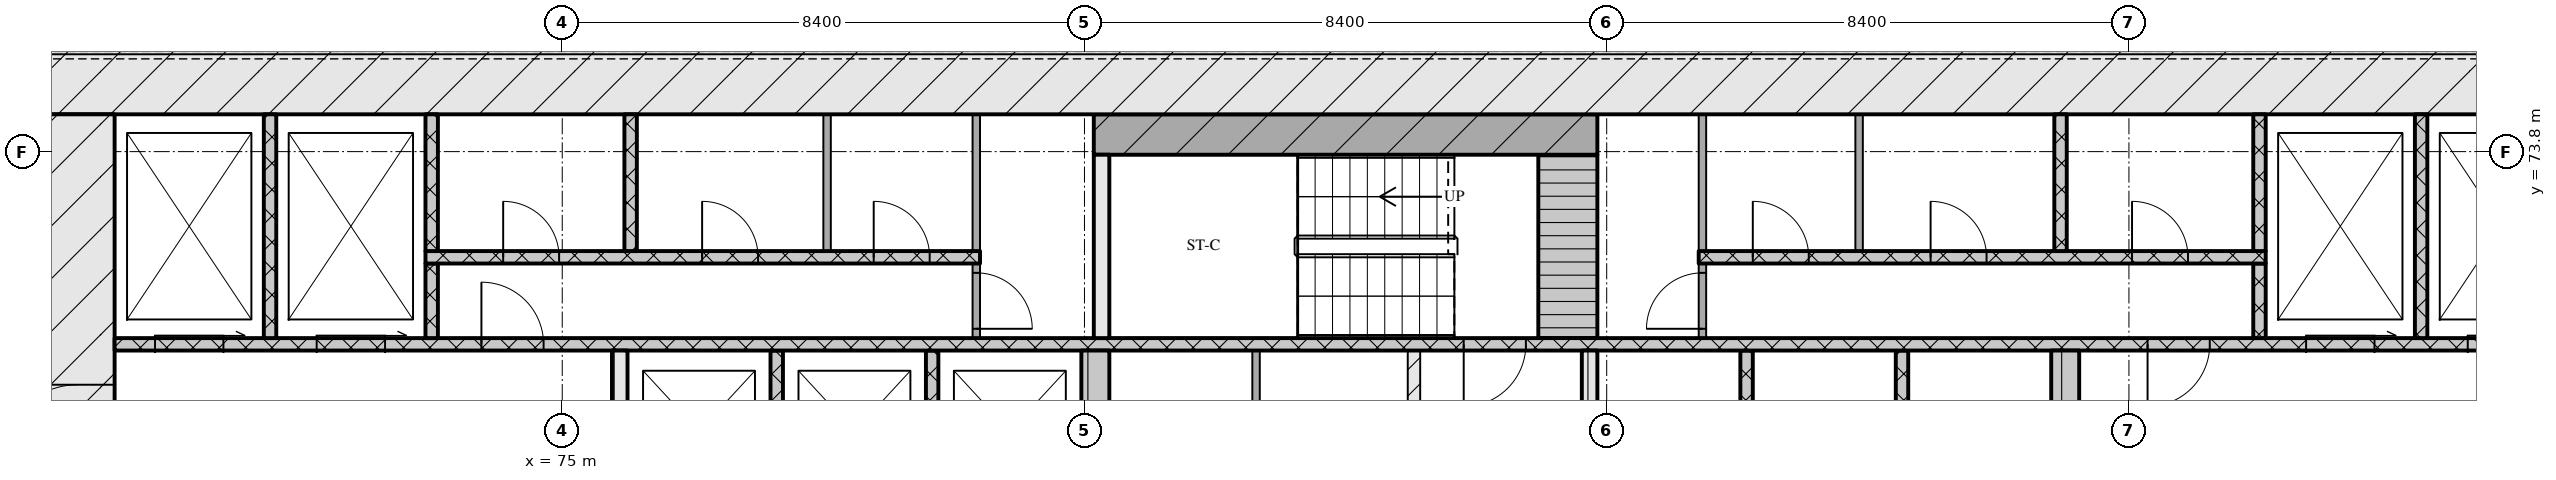
"""IFC4 building model, lengths in metres.
Left out: names, types, materials, properties, quantities, classifications, styles, units other than length and angle.
Written with IfcOpenShell. Run it as: python <this file> out.ifc"""

import sys

from ifc_helpers import new_model, si_unit, direction, frame, frame_2d, origin, place, context, subcontext, project, spatial, rectangle, extrude, element, fill, save


model = new_model("IFC4")
c1 = context("Model", 3, precision=1e-05, world=origin(), true_north=direction((0.0, 1.0)))
c2 = subcontext(c1, "Body", "Model", "MODEL_VIEW")
j1 = project(units=[si_unit("LENGTHUNIT", "METRE"), si_unit("PLANEANGLEUNIT", "RADIAN")], contexts=[c1])
p1 = place(None, origin())
s1 = spatial("IfcSite", under=j1, at=p1, CompositionType="ELEMENT")
p2 = place(p1, origin())
s2 = spatial("IfcBuilding", under=s1, at=p2, CompositionType="ELEMENT")
p3 = place(p2, frame((0.0, 0.0, 40.8)))
s3 = spatial("IfcBuildingStorey", under=s2, at=p3, CompositionType="ELEMENT", Elevation=40.8)
p4 = place(p3, frame((66.6, 75.0, 0.0), z_axis=(0.0, 0.0, 1.0), x_axis=(1.0, 0.0, 0.0)))
e1 = element("IfcWall", 1, at=p4, inside=s3, PredefinedType="SOLIDWALL", context=c2, shape_type="SweptSolid", body=[
    extrude(rectangle(XDim=42.0, YDim=1.2, at=frame_2d((21.0, 0.0))), origin(), (0.0, 0.0, 1.0), 3.32),
])
p5 = place(p3, frame((67.2, 62.4, 0.0), z_axis=(0.0, 0.0, 1.0), x_axis=(0.0, 1.0, 0.0)))
e2 = element("IfcWall", 2, at=p5, inside=s3, PredefinedType="SOLIDWALL", context=c2, shape_type="SweptSolid", body=[
    extrude(rectangle(XDim=12.0, YDim=1.2, at=frame_2d((6.0, 0.0))), origin(), (0.0, 0.0, 1.0), 3.32),
])
p6 = place(p5, frame((6.45, 0.0, 0.0)))
e3 = element("IfcOpeningElement", 3, at=p6, cuts=e2, PredefinedType="OPENING", context=c2, shape_type="SweptSolid", body=[
    extrude(rectangle(XDim=1.2, YDim=2.1, at=frame_2d((0.6, 1.05))), frame((0.0, 0.61, 0.0), z_axis=(0.0, -1.0, 0.0), x_axis=(1.0, 0.0, 0.0)), (0.0, 0.0, 1.0), 1.22),
])
for number, where, z_axis, x_axis in (
    (4, (78.45, 68.0, 0.0), (0.0, 0.0, 1.0), (0.0, 1.0, 0.0)),
    (5, (80.95, 68.0, 0.0), (0.0, 0.0, 1.0), (0.0, 1.0, 0.0)),
):
    element("IfcWall", number, at=place(p3, frame(where, z_axis=z_axis, x_axis=x_axis)), inside=s3, PredefinedType="SOLIDWALL", context=c2, shape_type="SweptSolid", body=[
        extrude(rectangle(XDim=2.6, YDim=0.2, at=frame_2d((1.3, 0.0))), origin(), (0.0, 0.0, 1.0), 3.32),
    ])
p7 = place(p3, frame((83.575, 68.0, 0.0), z_axis=(0.0, 0.0, 1.0), x_axis=(0.0, 1.0, 0.0)))
e6 = element("IfcWall", 6, at=p7, inside=s3, PredefinedType="SOLIDWALL", context=c2, shape_type="SweptSolid", body=[
    extrude(rectangle(XDim=2.6, YDim=0.45, at=frame_2d((1.3, 0.0))), origin(), (0.0, 0.0, 1.0), 3.32),
])
p8 = place(p3, frame((86.16, 68.0, 0.0), z_axis=(0.0, 0.0, 1.0), x_axis=(0.0, 1.0, 0.0)))
e7 = element("IfcWall", 7, at=p8, inside=s3, PredefinedType="PARTITIONING", context=c2, shape_type="SweptSolid", body=[
    extrude(rectangle(XDim=2.6, YDim=0.12, at=frame_2d((1.3, 0.0))), origin(), (0.0, 0.0, 1.0), 3.32),
])
p9 = place(p3, frame((88.7, 68.0, 0.0), z_axis=(0.0, 0.0, 1.0), x_axis=(0.0, 1.0, 0.0)))
e8 = element("IfcWall", 8, at=p9, inside=s3, PredefinedType="PARTITIONING", context=c2, shape_type="SweptSolid", body=[
    extrude(rectangle(XDim=2.6, YDim=0.2, at=frame_2d((1.3, 0.0))), origin(), (0.0, 0.0, 1.0), 3.32),
])
p10 = place(p3, frame((91.525, 68.0, 0.0), z_axis=(0.0, 0.0, 1.0), x_axis=(0.0, 1.0, 0.0)))
e9 = element("IfcWall", 9, at=p10, inside=s3, PredefinedType="SOLIDWALL", context=c2, shape_type="SweptSolid", body=[
    extrude(rectangle(XDim=2.6, YDim=0.25, at=frame_2d((1.3, 0.0))), origin(), (0.0, 0.0, 1.0), 3.32),
])
for number, where, z_axis, x_axis in (
    (10, (94.05, 68.0, 0.0), (0.0, 0.0, 1.0), (0.0, 1.0, 0.0)),
    (11, (96.55, 68.0, 0.0), (0.0, 0.0, 1.0), (0.0, 1.0, 0.0)),
):
    element("IfcWall", number, at=place(p3, frame(where, z_axis=z_axis, x_axis=x_axis)), inside=s3, PredefinedType="SOLIDWALL", context=c2, shape_type="SweptSolid", body=[
        extrude(rectangle(XDim=2.6, YDim=0.2, at=frame_2d((1.3, 0.0))), origin(), (0.0, 0.0, 1.0), 3.32),
    ])
p11 = place(p3, frame((75.925, 68.3, 0.0), z_axis=(0.0, 0.0, 1.0), x_axis=(0.0, 1.0, 0.0)))
e12 = element("IfcWall", 12, at=p11, inside=s3, PredefinedType="SOLIDWALL", context=c2, shape_type="SweptSolid", body=[
    extrude(rectangle(XDim=2.3, YDim=0.25, at=frame_2d((1.15, 0.0))), origin(), (0.0, 0.0, 1.0), 3.32),
])
p12 = place(p3, frame((99.175, 68.3, 0.0), z_axis=(0.0, 0.0, 1.0), x_axis=(0.0, 1.0, 0.0)))
e13 = element("IfcWall", 13, at=p12, inside=s3, PredefinedType="SOLIDWALL", context=c2, shape_type="SweptSolid", body=[
    extrude(rectangle(XDim=2.3, YDim=0.45, at=frame_2d((1.15, 0.0))), origin(), (0.0, 0.0, 1.0), 3.32),
])
p13 = place(p3, frame((67.8, 70.7, 0.0), z_axis=(0.0, 0.0, 1.0), x_axis=(1.0, 0.0, 0.0)))
e14 = element("IfcWall", 14, at=p13, inside=s3, PredefinedType="SOLIDWALL", context=c2, shape_type="SweptSolid", body=[
    extrude(rectangle(XDim=39.6, YDim=0.2, at=frame_2d((19.8, 0.0))), origin(), (0.0, 0.0, 1.0), 3.32),
])
p14 = place(p13, frame((0.65, 0.0, 0.0)))
e15 = element("IfcOpeningElement", 15, at=p14, cuts=e14, PredefinedType="OPENING", context=c2, shape_type="SweptSolid", body=[
    extrude(rectangle(XDim=1.1, YDim=2.1, at=frame_2d((0.55, 1.05))), frame((0.0, 0.11, 0.0), z_axis=(0.0, -1.0, 0.0), x_axis=(1.0, 0.0, 0.0)), (0.0, 0.0, 1.0), 0.22),
])
p15 = place(p13, frame((3.25, 0.0, 0.0)))
e16 = element("IfcOpeningElement", 16, at=p15, cuts=e14, PredefinedType="OPENING", context=c2, shape_type="SweptSolid", body=[
    extrude(rectangle(XDim=1.1, YDim=2.1, at=frame_2d((0.55, 1.05))), frame((0.0, 0.11, 0.0), z_axis=(0.0, -1.0, 0.0), x_axis=(1.0, 0.0, 0.0)), (0.0, 0.0, 1.0), 0.22),
])
p16 = place(p13, frame((5.9, 0.0, 0.0)))
e17 = element("IfcOpeningElement", 17, at=p16, cuts=e14, PredefinedType="OPENING", context=c2, shape_type="SweptSolid", body=[
    extrude(rectangle(XDim=1.0, YDim=2.1, at=frame_2d((0.5, 1.05))), frame((0.0, 0.11, 0.0), z_axis=(0.0, -1.0, 0.0), x_axis=(1.0, 0.0, 0.0)), (0.0, 0.0, 1.0), 0.22),
])
p17 = place(p13, frame((21.7, 0.0, 0.0)))
e18 = element("IfcOpeningElement", 18, at=p17, cuts=e14, PredefinedType="OPENING", context=c2, shape_type="SweptSolid", body=[
    extrude(rectangle(XDim=1.0, YDim=2.1, at=frame_2d((0.5, 1.05))), frame((0.0, 0.11, 0.0), z_axis=(0.0, -1.0, 0.0), x_axis=(1.0, 0.0, 0.0)), (0.0, 0.0, 1.0), 0.22),
])
p18 = place(p13, frame((32.7, 0.0, 0.0)))
e19 = element("IfcOpeningElement", 19, at=p18, cuts=e14, PredefinedType="OPENING", context=c2, shape_type="SweptSolid", body=[
    extrude(rectangle(XDim=1.0, YDim=2.1, at=frame_2d((0.5, 1.05))), frame((0.0, 0.11, 0.0), z_axis=(0.0, -1.0, 0.0), x_axis=(1.0, 0.0, 0.0)), (0.0, 0.0, 1.0), 0.22),
])
p19 = place(p13, frame((35.25, 0.0, 0.0)))
e20 = element("IfcOpeningElement", 20, at=p19, cuts=e14, PredefinedType="OPENING", context=c2, shape_type="SweptSolid", body=[
    extrude(rectangle(XDim=1.1, YDim=2.1, at=frame_2d((0.55, 1.05))), frame((0.0, 0.11, 0.0), z_axis=(0.0, -1.0, 0.0), x_axis=(1.0, 0.0, 0.0)), (0.0, 0.0, 1.0), 0.22),
])
p20 = place(p13, frame((37.85, 0.0, 0.0)))
e21 = element("IfcOpeningElement", 21, at=p20, cuts=e14, PredefinedType="OPENING", context=c2, shape_type="SweptSolid", body=[
    extrude(rectangle(XDim=1.1, YDim=2.1, at=frame_2d((0.55, 1.05))), frame((0.0, 0.11, 0.0), z_axis=(0.0, -1.0, 0.0), x_axis=(1.0, 0.0, 0.0)), (0.0, 0.0, 1.0), 0.22),
])
p21 = place(p3, frame((70.3, 70.8, 0.0), z_axis=(0.0, 0.0, 1.0), x_axis=(0.0, 1.0, 0.0)))
e22 = element("IfcWall", 22, at=p21, inside=s3, PredefinedType="SOLIDWALL", context=c2, shape_type="SweptSolid", body=[
    extrude(rectangle(XDim=3.6, YDim=0.2, at=frame_2d((1.8, 0.0))), origin(), (0.0, 0.0, 1.0), 3.32),
])
p22 = place(p3, frame((72.9, 70.8, 0.0), z_axis=(0.0, 0.0, 1.0), x_axis=(0.0, 1.0, 0.0)))
e23 = element("IfcWall", 23, at=p22, inside=s3, PredefinedType="SOLIDWALL", context=c2, shape_type="SweptSolid", body=[
    extrude(rectangle(XDim=1.2, YDim=0.2, at=frame_2d((0.6, 0.0))), origin(), (0.0, 0.0, 1.0), 3.32),
])
p23 = place(p3, frame((81.66, 70.8, 0.0), z_axis=(0.0, 0.0, 1.0), x_axis=(0.0, 1.0, 0.0)))
e24 = element("IfcWall", 24, at=p23, inside=s3, PredefinedType="PARTITIONING", context=c2, shape_type="SweptSolid", body=[
    extrude(rectangle(XDim=1.2, YDim=0.12, at=frame_2d((0.6, 0.0))), origin(), (0.0, 0.0, 1.0), 3.32),
])
p24 = place(p23, frame((0.15, 0.0, 0.0)))
e25 = element("IfcOpeningElement", 25, at=p24, cuts=e24, PredefinedType="OPENING", context=c2, shape_type="SweptSolid", body=[
    extrude(rectangle(XDim=0.9, YDim=2.1, at=frame_2d((0.45, 1.05))), frame((0.0, 0.07, 0.0), z_axis=(0.0, -1.0, 0.0), x_axis=(1.0, 0.0, 0.0)), (0.0, 0.0, 1.0), 0.14),
])
p25 = place(p3, frame((83.675, 70.8, 0.0), z_axis=(0.0, 0.0, 1.0), x_axis=(0.0, 1.0, 0.0)))
e26 = element("IfcWall", 26, at=p25, inside=s3, PredefinedType="SOLIDWALL", context=c2, shape_type="SweptSolid", body=[
    extrude(rectangle(XDim=2.95, YDim=0.25, at=frame_2d((1.475, 0.0))), origin(), (0.0, 0.0, 1.0), 3.32),
])
p26 = place(p3, frame((91.175, 70.8, 0.0), z_axis=(0.0, 0.0, 1.0), x_axis=(0.0, 1.0, 0.0)))
e27 = element("IfcWall", 27, at=p26, inside=s3, PredefinedType="SOLIDWALL", context=c2, shape_type="SweptSolid", body=[
    extrude(rectangle(XDim=2.95, YDim=0.95, at=frame_2d((1.475, 0.0))), origin(), (0.0, 0.0, 1.0), 3.32),
])
p27 = place(p3, frame((93.34, 70.8, 0.0), z_axis=(0.0, 0.0, 1.0), x_axis=(0.0, 1.0, 0.0)))
e28 = element("IfcWall", 28, at=p27, inside=s3, PredefinedType="PARTITIONING", context=c2, shape_type="SweptSolid", body=[
    extrude(rectangle(XDim=1.2, YDim=0.12, at=frame_2d((0.6, 0.0))), origin(), (0.0, 0.0, 1.0), 3.32),
])
p28 = place(p27, frame((0.15, 0.0, 0.0)))
e29 = element("IfcOpeningElement", 29, at=p28, cuts=e28, PredefinedType="OPENING", context=c2, shape_type="SweptSolid", body=[
    extrude(rectangle(XDim=0.9, YDim=2.1, at=frame_2d((0.45, 1.05))), frame((0.0, 0.07, 0.0), z_axis=(0.0, -1.0, 0.0), x_axis=(1.0, 0.0, 0.0)), (0.0, 0.0, 1.0), 0.14),
])
p29 = place(p3, frame((102.3, 70.8, 0.0), z_axis=(0.0, 0.0, 1.0), x_axis=(0.0, 1.0, 0.0)))
e30 = element("IfcWall", 30, at=p29, inside=s3, PredefinedType="SOLIDWALL", context=c2, shape_type="SweptSolid", body=[
    extrude(rectangle(XDim=1.2, YDim=0.2, at=frame_2d((0.6, 0.0))), origin(), (0.0, 0.0, 1.0), 3.32),
])
p30 = place(p3, frame((104.9, 70.8, 0.0), z_axis=(0.0, 0.0, 1.0), x_axis=(0.0, 1.0, 0.0)))
e31 = element("IfcWall", 31, at=p30, inside=s3, PredefinedType="SOLIDWALL", context=c2, shape_type="SweptSolid", body=[
    extrude(rectangle(XDim=3.6, YDim=0.2, at=frame_2d((1.8, 0.0))), origin(), (0.0, 0.0, 1.0), 3.32),
])
p31 = place(p3, frame((72.8, 72.1, 0.0), z_axis=(0.0, 0.0, 1.0), x_axis=(1.0, 0.0, 0.0)))
e32 = element("IfcWall", 32, at=p31, inside=s3, PredefinedType="SOLIDWALL", context=c2, shape_type="SweptSolid", body=[
    extrude(rectangle(XDim=8.92, YDim=0.2, at=frame_2d((4.46, 0.0))), origin(), (0.0, 0.0, 1.0), 3.32),
])
p32 = place(p31, frame((1.25, 0.0, 0.0)))
e33 = element("IfcOpeningElement", 33, at=p32, cuts=e32, PredefinedType="OPENING", context=c2, shape_type="SweptSolid", body=[
    extrude(rectangle(XDim=0.9, YDim=2.1, at=frame_2d((0.45, 1.05))), frame((0.0, 0.11, 0.0), z_axis=(0.0, -1.0, 0.0), x_axis=(1.0, 0.0, 0.0)), (0.0, 0.0, 1.0), 0.22),
])
p33 = place(p31, frame((4.45, 0.0, 0.0)))
e34 = element("IfcOpeningElement", 34, at=p33, cuts=e32, PredefinedType="OPENING", context=c2, shape_type="SweptSolid", body=[
    extrude(rectangle(XDim=0.9, YDim=2.1, at=frame_2d((0.45, 1.05))), frame((0.0, 0.11, 0.0), z_axis=(0.0, -1.0, 0.0), x_axis=(1.0, 0.0, 0.0)), (0.0, 0.0, 1.0), 0.22),
])
p34 = place(p31, frame((7.21, 0.0, 0.0)))
e35 = element("IfcOpeningElement", 35, at=p34, cuts=e32, PredefinedType="OPENING", context=c2, shape_type="SweptSolid", body=[
    extrude(rectangle(XDim=0.9, YDim=2.1, at=frame_2d((0.45, 1.05))), frame((0.0, 0.11, 0.0), z_axis=(0.0, -1.0, 0.0), x_axis=(1.0, 0.0, 0.0)), (0.0, 0.0, 1.0), 0.22),
])
p35 = place(p3, frame((93.28, 72.1, 0.0), z_axis=(0.0, 0.0, 1.0), x_axis=(1.0, 0.0, 0.0)))
e36 = element("IfcWall", 36, at=p35, inside=s3, PredefinedType="SOLIDWALL", context=c2, shape_type="SweptSolid", body=[
    extrude(rectangle(XDim=9.12, YDim=0.2, at=frame_2d((4.56, 0.0))), origin(), (0.0, 0.0, 1.0), 3.32),
])
p36 = place(p35, frame((0.87, 0.0, 0.0)))
e37 = element("IfcOpeningElement", 37, at=p36, cuts=e36, PredefinedType="OPENING", context=c2, shape_type="SweptSolid", body=[
    extrude(rectangle(XDim=0.9, YDim=2.1, at=frame_2d((0.45, 1.05))), frame((0.0, 0.11, 0.0), z_axis=(0.0, -1.0, 0.0), x_axis=(1.0, 0.0, 0.0)), (0.0, 0.0, 1.0), 0.22),
])
p37 = place(p35, frame((3.73, 0.0, 0.0)))
e38 = element("IfcOpeningElement", 38, at=p37, cuts=e36, PredefinedType="OPENING", context=c2, shape_type="SweptSolid", body=[
    extrude(rectangle(XDim=0.9, YDim=2.1, at=frame_2d((0.45, 1.05))), frame((0.0, 0.11, 0.0), z_axis=(0.0, -1.0, 0.0), x_axis=(1.0, 0.0, 0.0)), (0.0, 0.0, 1.0), 0.22),
])
p38 = place(p35, frame((6.97, 0.0, 0.0)))
e39 = element("IfcOpeningElement", 39, at=p38, cuts=e36, PredefinedType="OPENING", context=c2, shape_type="SweptSolid", body=[
    extrude(rectangle(XDim=0.9, YDim=2.1, at=frame_2d((0.45, 1.05))), frame((0.0, 0.11, 0.0), z_axis=(0.0, -1.0, 0.0), x_axis=(1.0, 0.0, 0.0)), (0.0, 0.0, 1.0), 0.22),
])
for number, where, z_axis, x_axis in (
    (40, (72.9, 72.2, 0.0), (0.0, 0.0, 1.0), (0.0, 1.0, 0.0)),
    (41, (76.1, 72.2, 0.0), (0.0, 0.0, 1.0), (0.0, 1.0, 0.0)),
):
    element("IfcWall", number, at=place(p3, frame(where, z_axis=z_axis, x_axis=x_axis)), inside=s3, PredefinedType="SOLIDWALL", context=c2, shape_type="SweptSolid", body=[
        extrude(rectangle(XDim=2.2, YDim=0.2, at=frame_2d((1.1, 0.0))), origin(), (0.0, 0.0, 1.0), 3.32),
    ])
for number, where, z_axis, x_axis in (
    (42, (79.26, 72.2, 0.0), (0.0, 0.0, 1.0), (0.0, 1.0, 0.0)),
    (43, (81.66, 72.2, 0.0), (0.0, 0.0, 1.0), (0.0, 1.0, 0.0)),
    (44, (93.34, 72.2, 0.0), (0.0, 0.0, 1.0), (0.0, 1.0, 0.0)),
    (45, (95.86, 72.2, 0.0), (0.0, 0.0, 1.0), (0.0, 1.0, 0.0)),
):
    element("IfcWall", number, at=place(p3, frame(where, z_axis=z_axis, x_axis=x_axis)), inside=s3, PredefinedType="PARTITIONING", context=c2, shape_type="SweptSolid", body=[
        extrude(rectangle(XDim=2.2, YDim=0.12, at=frame_2d((1.1, 0.0))), origin(), (0.0, 0.0, 1.0), 3.32),
    ])
for number, where, z_axis, x_axis in (
    (46, (99.1, 72.2, 0.0), (0.0, 0.0, 1.0), (0.0, 1.0, 0.0)),
    (47, (102.3, 72.2, 0.0), (0.0, 0.0, 1.0), (0.0, 1.0, 0.0)),
):
    element("IfcWall", number, at=place(p3, frame(where, z_axis=z_axis, x_axis=x_axis)), inside=s3, PredefinedType="SOLIDWALL", context=c2, shape_type="SweptSolid", body=[
        extrude(rectangle(XDim=2.2, YDim=0.2, at=frame_2d((1.1, 0.0))), origin(), (0.0, 0.0, 1.0), 3.32),
    ])
p39 = place(p3, frame((83.55, 74.075, 0.0), z_axis=(0.0, 0.0, 1.0), x_axis=(1.0, 0.0, 0.0)))
e48 = element("IfcWall", 48, at=p39, inside=s3, PredefinedType="SOLIDWALL", context=c2, shape_type="SweptSolid", body=[
    extrude(rectangle(XDim=8.1, YDim=0.65, at=frame_2d((4.05, 0.0))), origin(), (0.0, 0.0, 1.0), 3.32),
])
p40 = place(p6, origin())
e49 = element("IfcDoor", 49, at=p40, inside=s3, OperationType="SINGLE_SWING_LEFT", PredefinedType="DOOR", context=c2, shape_type="SweptSolid", body=[
    extrude(rectangle(XDim=1.2, YDim=2.1, at=frame_2d((0.6, 1.05))), frame((0.0, 0.025, 0.0), z_axis=(0.0, -1.0, 0.0), x_axis=(1.0, 0.0, 0.0)), (0.0, 0.0, 1.0), 0.05),
])
fill(e3, e49)
p41 = place(p14, origin())
e50 = element("IfcDoor", 50, at=p41, inside=s3, OperationType="SLIDING_TO_RIGHT", PredefinedType="DOOR", context=c2, shape_type="SweptSolid", body=[
    extrude(rectangle(XDim=1.1, YDim=2.1, at=frame_2d((0.55, 1.05))), frame((0.0, 0.025, 0.0), z_axis=(0.0, -1.0, 0.0), x_axis=(1.0, 0.0, 0.0)), (0.0, 0.0, 1.0), 0.05),
])
fill(e15, e50)
p42 = place(p15, origin())
e51 = element("IfcDoor", 51, at=p42, inside=s3, OperationType="SLIDING_TO_RIGHT", PredefinedType="DOOR", context=c2, shape_type="SweptSolid", body=[
    extrude(rectangle(XDim=1.1, YDim=2.1, at=frame_2d((0.55, 1.05))), frame((0.0, 0.025, 0.0), z_axis=(0.0, -1.0, 0.0), x_axis=(1.0, 0.0, 0.0)), (0.0, 0.0, 1.0), 0.05),
])
fill(e16, e51)
p43 = place(p16, origin())
e52 = element("IfcDoor", 52, at=p43, inside=s3, OperationType="SINGLE_SWING_LEFT", PredefinedType="DOOR", context=c2, shape_type="SweptSolid", body=[
    extrude(rectangle(XDim=1.0, YDim=2.1, at=frame_2d((0.5, 1.05))), frame((0.0, 0.025, 0.0), z_axis=(0.0, -1.0, 0.0), x_axis=(1.0, 0.0, 0.0)), (0.0, 0.0, 1.0), 0.05),
])
fill(e17, e52)
p44 = place(p17, origin())
e53 = element("IfcDoor", 53, at=p44, inside=s3, OperationType="SINGLE_SWING_RIGHT", PredefinedType="DOOR", context=c2, shape_type="SweptSolid", body=[
    extrude(rectangle(XDim=1.0, YDim=2.1, at=frame_2d((0.5, 1.05))), frame((0.0, 0.025, 0.0), z_axis=(0.0, -1.0, 0.0), x_axis=(1.0, 0.0, 0.0)), (0.0, 0.0, 1.0), 0.05),
])
fill(e18, e53)
p45 = place(p18, origin())
e54 = element("IfcDoor", 54, at=p45, inside=s3, OperationType="SINGLE_SWING_RIGHT", PredefinedType="DOOR", context=c2, shape_type="SweptSolid", body=[
    extrude(rectangle(XDim=1.0, YDim=2.1, at=frame_2d((0.5, 1.05))), frame((0.0, 0.025, 0.0), z_axis=(0.0, -1.0, 0.0), x_axis=(1.0, 0.0, 0.0)), (0.0, 0.0, 1.0), 0.05),
])
fill(e19, e54)
p46 = place(p19, origin())
e55 = element("IfcDoor", 55, at=p46, inside=s3, OperationType="SLIDING_TO_RIGHT", PredefinedType="DOOR", context=c2, shape_type="SweptSolid", body=[
    extrude(rectangle(XDim=1.1, YDim=2.1, at=frame_2d((0.55, 1.05))), frame((0.0, 0.025, 0.0), z_axis=(0.0, -1.0, 0.0), x_axis=(1.0, 0.0, 0.0)), (0.0, 0.0, 1.0), 0.05),
])
fill(e20, e55)
p47 = place(p20, origin())
e56 = element("IfcDoor", 56, at=p47, inside=s3, OperationType="SLIDING_TO_RIGHT", PredefinedType="DOOR", context=c2, shape_type="SweptSolid", body=[
    extrude(rectangle(XDim=1.1, YDim=2.1, at=frame_2d((0.55, 1.05))), frame((0.0, 0.025, 0.0), z_axis=(0.0, -1.0, 0.0), x_axis=(1.0, 0.0, 0.0)), (0.0, 0.0, 1.0), 0.05),
])
fill(e21, e56)
p48 = place(p24, origin())
e57 = element("IfcDoor", 57, at=p48, inside=s3, OperationType="SINGLE_SWING_RIGHT", PredefinedType="DOOR", context=c2, shape_type="SweptSolid", body=[
    extrude(rectangle(XDim=0.9, YDim=2.1, at=frame_2d((0.45, 1.05))), frame((0.0, 0.025, 0.0), z_axis=(0.0, -1.0, 0.0), x_axis=(1.0, 0.0, 0.0)), (0.0, 0.0, 1.0), 0.05),
])
fill(e25, e57)
p49 = place(p28, origin())
e58 = element("IfcDoor", 58, at=p49, inside=s3, OperationType="SINGLE_SWING_LEFT", PredefinedType="DOOR", context=c2, shape_type="SweptSolid", body=[
    extrude(rectangle(XDim=0.9, YDim=2.1, at=frame_2d((0.45, 1.05))), frame((0.0, 0.025, 0.0), z_axis=(0.0, -1.0, 0.0), x_axis=(1.0, 0.0, 0.0)), (0.0, 0.0, 1.0), 0.05),
])
fill(e29, e58)
p50 = place(p32, origin())
e59 = element("IfcDoor", 59, at=p50, inside=s3, OperationType="SINGLE_SWING_LEFT", PredefinedType="DOOR", context=c2, shape_type="SweptSolid", body=[
    extrude(rectangle(XDim=0.9, YDim=2.1, at=frame_2d((0.45, 1.05))), frame((0.0, 0.025, 0.0), z_axis=(0.0, -1.0, 0.0), x_axis=(1.0, 0.0, 0.0)), (0.0, 0.0, 1.0), 0.05),
])
fill(e33, e59)
p51 = place(p33, origin())
e60 = element("IfcDoor", 60, at=p51, inside=s3, OperationType="SINGLE_SWING_LEFT", PredefinedType="DOOR", context=c2, shape_type="SweptSolid", body=[
    extrude(rectangle(XDim=0.9, YDim=2.1, at=frame_2d((0.45, 1.05))), frame((0.0, 0.025, 0.0), z_axis=(0.0, -1.0, 0.0), x_axis=(1.0, 0.0, 0.0)), (0.0, 0.0, 1.0), 0.05),
])
fill(e34, e60)
p52 = place(p34, origin())
e61 = element("IfcDoor", 61, at=p52, inside=s3, OperationType="SINGLE_SWING_LEFT", PredefinedType="DOOR", context=c2, shape_type="SweptSolid", body=[
    extrude(rectangle(XDim=0.9, YDim=2.1, at=frame_2d((0.45, 1.05))), frame((0.0, 0.025, 0.0), z_axis=(0.0, -1.0, 0.0), x_axis=(1.0, 0.0, 0.0)), (0.0, 0.0, 1.0), 0.05),
])
fill(e35, e61)
p53 = place(p36, origin())
e62 = element("IfcDoor", 62, at=p53, inside=s3, OperationType="SINGLE_SWING_LEFT", PredefinedType="DOOR", context=c2, shape_type="SweptSolid", body=[
    extrude(rectangle(XDim=0.9, YDim=2.1, at=frame_2d((0.45, 1.05))), frame((0.0, 0.025, 0.0), z_axis=(0.0, -1.0, 0.0), x_axis=(1.0, 0.0, 0.0)), (0.0, 0.0, 1.0), 0.05),
])
fill(e37, e62)
p54 = place(p37, origin())
e63 = element("IfcDoor", 63, at=p54, inside=s3, OperationType="SINGLE_SWING_LEFT", PredefinedType="DOOR", context=c2, shape_type="SweptSolid", body=[
    extrude(rectangle(XDim=0.9, YDim=2.1, at=frame_2d((0.45, 1.05))), frame((0.0, 0.025, 0.0), z_axis=(0.0, -1.0, 0.0), x_axis=(1.0, 0.0, 0.0)), (0.0, 0.0, 1.0), 0.05),
])
fill(e38, e63)
p55 = place(p38, origin())
e64 = element("IfcDoor", 64, at=p55, inside=s3, OperationType="SINGLE_SWING_LEFT", PredefinedType="DOOR", context=c2, shape_type="SweptSolid", body=[
    extrude(rectangle(XDim=0.9, YDim=2.1, at=frame_2d((0.45, 1.05))), frame((0.0, 0.025, 0.0), z_axis=(0.0, -1.0, 0.0), x_axis=(1.0, 0.0, 0.0)), (0.0, 0.0, 1.0), 0.05),
])
fill(e39, e64)
save(model, sys.argv[1])
